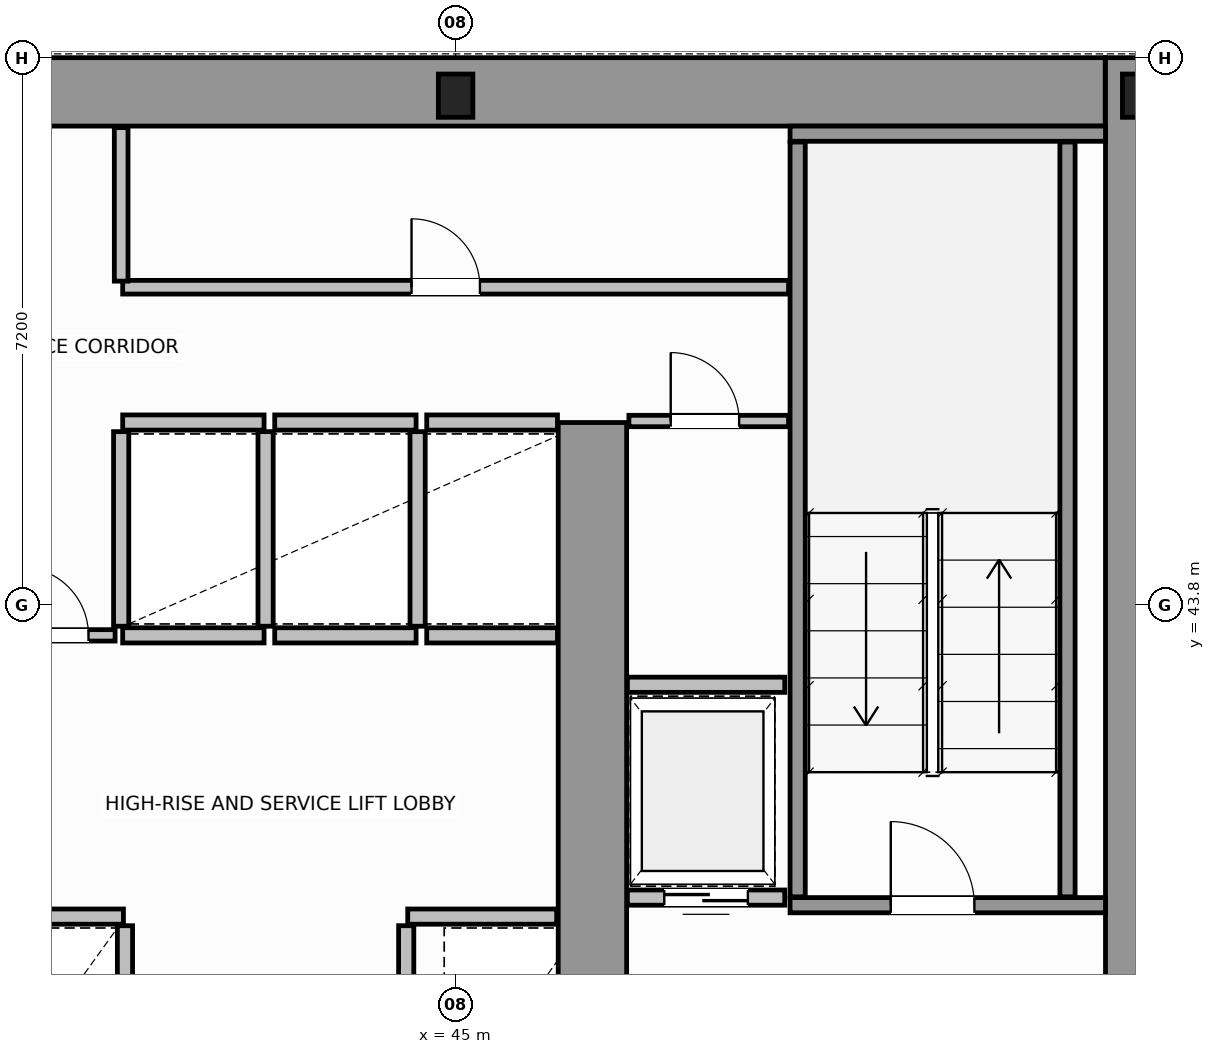
"""IFC4 building model, lengths in metres.
Left out: names, types, materials, properties, quantities, classifications, styles, units other than length and angle.
Written with IfcOpenShell. Run it as: python <this file> out.ifc"""

import sys

from ifc_helpers import new_model, si_unit, direction, frame, frame_2d, origin, origin_2d, place, context, subcontext, project, spatial, rectangle, i_section, extrude, source, transform, mapped, element, fill, save


model = new_model("IFC4")
c1 = context("Model", 3, precision=1e-05, world=origin(), true_north=direction((0.0, 1.0)))
c2 = subcontext(c1, "Body", "Model", "MODEL_VIEW")
j1 = project(units=[si_unit("LENGTHUNIT", "METRE"), si_unit("PLANEANGLEUNIT", "RADIAN")], contexts=[c1])
p1 = place(None, origin())
s1 = spatial("IfcSite", under=j1, at=p1, CompositionType="ELEMENT")
p2 = place(p1, origin())
s2 = spatial("IfcBuilding", under=s1, at=p2, CompositionType="ELEMENT")
p3 = place(p2, frame((0.0, 0.0, 56.8)))
s3 = spatial("IfcBuildingStorey", under=s2, at=p3, CompositionType="ELEMENT", Elevation=56.8)
m1 = source(origin(), c2, "Body", "SweptSolid", [
    extrude(i_section(OverallWidth=0.454, OverallDepth=0.569, WebThickness=0.078, FlangeThickness=0.08, FilletRadius=0.015, at=origin_2d()), origin(), (0.0, 0.0, 1.0), 3.8),
])
for number, where, z_axis, x_axis in (
    (1, (45.0, 50.5, 0.0), (0.0, 0.0, 1.0), (1.0, 0.0, 0.0)),
    (2, (54.0, 50.5, 0.0), (0.0, 0.0, 1.0), (1.0, 0.0, 0.0)),
):
    element("IfcColumn", number, at=place(p3, frame(where, z_axis=z_axis, x_axis=x_axis)), inside=s3, PredefinedType="COLUMN", context=c2, shape_type="MappedRepresentation", body=[
        mapped(m1, transform((0.0, 0.0, 0.0), scale=1.0)),
    ])
p4 = place(p3, frame((34.002, 50.55, 0.0), z_axis=(0.0, 0.0, 1.0), x_axis=(1.0, 0.0, 0.0)))
e3 = element("IfcWall", 3, at=p4, inside=s3, PredefinedType="SHEAR", context=c2, shape_type="SweptSolid", body=[
    extrude(rectangle(XDim=19.544, YDim=0.9, at=frame_2d((9.772, 0.0))), origin(), (0.0, 0.0, 1.0), 3.8),
])
p5 = place(p3, frame((54.0, 36.5, 0.0), z_axis=(0.0, 0.0, 1.0), x_axis=(0.0, 1.0, 0.0)))
e4 = element("IfcWall", 4, at=p5, inside=s3, PredefinedType="SHEAR", context=c2, shape_type="SweptSolid", body=[
    extrude(rectangle(XDim=14.5, YDim=0.9, at=frame_2d((7.25, 0.0))), origin(), (0.0, 0.0, 1.0), 3.8),
])
p6 = place(p3, frame((46.8, 36.97, 0.0), z_axis=(0.0, 0.0, 1.0), x_axis=(0.0, 1.0, 0.0)))
e5 = element("IfcWall", 5, at=p6, inside=s3, PredefinedType="SHEAR", context=c2, shape_type="SweptSolid", body=[
    extrude(rectangle(XDim=9.23, YDim=0.9, at=frame_2d((4.615, 0.0))), origin(), (0.0, 0.0, 1.0), 3.8),
])
p7 = place(p3, frame((49.4, 39.85, 0.0), z_axis=(0.0, 0.0, 1.0), x_axis=(1.0, 0.0, 0.0)))
e6 = element("IfcWall", 6, at=p7, inside=s3, PredefinedType="SOLIDWALL", context=c2, shape_type="SweptSolid", body=[
    extrude(rectangle(XDim=4.15, YDim=0.2, at=frame_2d((2.075, 0.0))), origin(), (0.0, 0.0, 1.0), 3.8),
])
p8 = place(p7, frame((1.325, 0.0, 0.0)))
e7 = element("IfcOpeningElement", 7, at=p8, cuts=e6, PredefinedType="OPENING", context=c2, shape_type="SweptSolid", body=[
    extrude(rectangle(XDim=1.1, YDim=2.15, at=frame_2d((0.55, 1.075))), frame((0.0, 0.11, 0.0), z_axis=(0.0, -1.0, 0.0), x_axis=(1.0, 0.0, 0.0)), (0.0, 0.0, 1.0), 0.22),
])
p9 = place(p3, frame((49.4, 50.0, 0.0), z_axis=(0.0, 0.0, 1.0), x_axis=(1.0, 0.0, 0.0)))
e8 = element("IfcWall", 8, at=p9, inside=s3, PredefinedType="SOLIDWALL", context=c2, shape_type="SweptSolid", body=[
    extrude(rectangle(XDim=4.15, YDim=0.2, at=frame_2d((2.075, 0.0))), origin(), (0.0, 0.0, 1.0), 3.8),
])
for number, where, z_axis, x_axis in (
    (9, (49.5, 39.96, 0.0), (0.0, 0.0, 1.0), (0.0, 1.0, 0.0)),
    (10, (53.05, 39.96, 0.0), (0.0, 0.0, 1.0), (0.0, 1.0, 0.0)),
):
    element("IfcWall", number, at=place(p3, frame(where, z_axis=z_axis, x_axis=x_axis)), inside=s3, PredefinedType="SOLIDWALL", context=c2, shape_type="SweptSolid", body=[
        extrude(rectangle(XDim=9.93, YDim=0.2, at=frame_2d((4.965, 0.0))), origin(), (0.0, 0.0, 1.0), 3.8),
    ])
p10 = place(p3, frame((38.86, 39.7, 0.0), z_axis=(0.0, 0.0, 1.0), x_axis=(1.0, 0.0, 0.0)))
e11 = element("IfcWall", 11, at=p10, inside=s3, PredefinedType="SOLIDWALL", context=c2, shape_type="SweptSolid", body=[
    extrude(rectangle(XDim=1.77, YDim=0.2, at=frame_2d((0.885, 0.0))), origin(), (0.0, 0.0, 1.0), 3.58),
])
p11 = place(p3, frame((40.65, 37.02, 0.0), z_axis=(0.0, 0.0, 1.0), x_axis=(0.0, 1.0, 0.0)))
e12 = element("IfcWall", 12, at=p11, inside=s3, PredefinedType="SOLIDWALL", context=c2, shape_type="SweptSolid", body=[
    extrude(rectangle(XDim=2.56, YDim=0.2, at=frame_2d((1.28, 0.0))), origin(), (0.0, 0.0, 1.0), 3.58),
])
p12 = place(p3, frame((44.37, 39.7, 0.0), z_axis=(0.0, 0.0, 1.0), x_axis=(1.0, 0.0, 0.0)))
e13 = element("IfcWall", 13, at=p12, inside=s3, PredefinedType="SOLIDWALL", context=c2, shape_type="SweptSolid", body=[
    extrude(rectangle(XDim=1.96, YDim=0.2, at=frame_2d((0.98, 0.0))), origin(), (0.0, 0.0, 1.0), 3.58),
])
p13 = place(p3, frame((44.35, 37.02, 0.0), z_axis=(0.0, 0.0, 1.0), x_axis=(0.0, 1.0, 0.0)))
e14 = element("IfcWall", 14, at=p13, inside=s3, PredefinedType="SOLIDWALL", context=c2, shape_type="SweptSolid", body=[
    extrude(rectangle(XDim=2.56, YDim=0.2, at=frame_2d((1.28, 0.0))), origin(), (0.0, 0.0, 1.0), 3.58),
])
for number, where, z_axis, x_axis in (
    (15, (40.62, 43.4, 0.0), (0.0, 0.0, 1.0), (1.0, 0.0, 0.0)),
    (16, (40.62, 46.2, 0.0), (0.0, 0.0, 1.0), (1.0, 0.0, 0.0)),
):
    element("IfcWall", number, at=place(p3, frame(where, z_axis=z_axis, x_axis=x_axis)), inside=s3, PredefinedType="SOLIDWALL", context=c2, shape_type="SweptSolid", body=[
        extrude(rectangle(XDim=1.86, YDim=0.2, at=frame_2d((0.93, 0.0))), origin(), (0.0, 0.0, 1.0), 3.58),
    ])
for number, where, z_axis, x_axis in (
    (17, (40.6, 43.52, 0.0), (0.0, 0.0, 1.0), (0.0, 1.0, 0.0)),
    (18, (42.5, 43.52, 0.0), (0.0, 0.0, 1.0), (0.0, 1.0, 0.0)),
):
    element("IfcWall", number, at=place(p3, frame(where, z_axis=z_axis, x_axis=x_axis)), inside=s3, PredefinedType="SOLIDWALL", context=c2, shape_type="SweptSolid", body=[
        extrude(rectangle(XDim=2.56, YDim=0.2, at=frame_2d((1.28, 0.0))), origin(), (0.0, 0.0, 1.0), 3.58),
    ])
for number, where, z_axis, x_axis in (
    (19, (42.62, 43.4, 0.0), (0.0, 0.0, 1.0), (1.0, 0.0, 0.0)),
    (20, (42.62, 46.2, 0.0), (0.0, 0.0, 1.0), (1.0, 0.0, 0.0)),
):
    element("IfcWall", number, at=place(p3, frame(where, z_axis=z_axis, x_axis=x_axis)), inside=s3, PredefinedType="SOLIDWALL", context=c2, shape_type="SweptSolid", body=[
        extrude(rectangle(XDim=1.86, YDim=0.2, at=frame_2d((0.93, 0.0))), origin(), (0.0, 0.0, 1.0), 3.58),
    ])
p14 = place(p3, frame((44.5, 43.52, 0.0), z_axis=(0.0, 0.0, 1.0), x_axis=(0.0, 1.0, 0.0)))
e21 = element("IfcWall", 21, at=p14, inside=s3, PredefinedType="SOLIDWALL", context=c2, shape_type="SweptSolid", body=[
    extrude(rectangle(XDim=2.56, YDim=0.2, at=frame_2d((1.28, 0.0))), origin(), (0.0, 0.0, 1.0), 3.58),
])
for number, where, z_axis, x_axis in (
    (22, (44.62, 43.4, 0.0), (0.0, 0.0, 1.0), (1.0, 0.0, 0.0)),
    (23, (44.62, 46.2, 0.0), (0.0, 0.0, 1.0), (1.0, 0.0, 0.0)),
):
    element("IfcWall", number, at=place(p3, frame(where, z_axis=z_axis, x_axis=x_axis)), inside=s3, PredefinedType="SOLIDWALL", context=c2, shape_type="SweptSolid", body=[
        extrude(rectangle(XDim=1.72, YDim=0.2, at=frame_2d((0.86, 0.0))), origin(), (0.0, 0.0, 1.0), 3.58),
    ])
p15 = place(p3, frame((47.26, 39.95, 0.0), z_axis=(0.0, 0.0, 1.0), x_axis=(1.0, 0.0, 0.0)))
e24 = element("IfcWall", 24, at=p15, inside=s3, PredefinedType="SOLIDWALL", context=c2, shape_type="SweptSolid", body=[
    extrude(rectangle(XDim=2.07, YDim=0.2, at=frame_2d((1.035, 0.0))), origin(), (0.0, 0.0, 1.0), 3.58),
])
p16 = place(p15, frame((0.485, 0.0, 0.0)))
e25 = element("IfcOpeningElement", 25, at=p16, cuts=e24, PredefinedType="OPENING", context=c2, shape_type="SweptSolid", body=[
    extrude(rectangle(XDim=1.1, YDim=2.15, at=frame_2d((0.55, 1.075))), frame((0.0, 0.11, 0.0), z_axis=(0.0, -1.0, 0.0), x_axis=(1.0, 0.0, 0.0)), (0.0, 0.0, 1.0), 0.22),
])
p17 = place(p3, frame((47.26, 42.75, 0.0), z_axis=(0.0, 0.0, 1.0), x_axis=(1.0, 0.0, 0.0)))
e26 = element("IfcWall", 26, at=p17, inside=s3, PredefinedType="SOLIDWALL", context=c2, shape_type="SweptSolid", body=[
    extrude(rectangle(XDim=2.07, YDim=0.2, at=frame_2d((1.035, 0.0))), origin(), (0.0, 0.0, 1.0), 3.58),
])
p18 = place(p3, frame((47.28, 46.22, 0.0), z_axis=(0.0, 0.0, 1.0), x_axis=(1.0, 0.0, 0.0)))
e27 = element("IfcWall", 27, at=p18, inside=s3, PredefinedType="PARTITIONING", context=c2, shape_type="SweptSolid", body=[
    extrude(rectangle(XDim=2.1, YDim=0.15, at=frame_2d((1.05, 0.0))), origin(), (0.0, 0.0, 1.0), 3.58),
])
p19 = place(p18, frame((0.55, 0.0, 0.0)))
e28 = element("IfcOpeningElement", 28, at=p19, cuts=e27, PredefinedType="OPENING", context=c2, shape_type="SweptSolid", body=[
    extrude(rectangle(XDim=0.9, YDim=2.1, at=frame_2d((0.45, 1.05))), frame((0.0, 0.085, 0.0), z_axis=(0.0, -1.0, 0.0), x_axis=(1.0, 0.0, 0.0)), (0.0, 0.0, 1.0), 0.17),
])
p20 = place(p3, frame((38.92, 43.4, 0.0), z_axis=(0.0, 0.0, 1.0), x_axis=(1.0, 0.0, 0.0)))
e29 = element("IfcWall", 29, at=p20, inside=s3, PredefinedType="PARTITIONING", context=c2, shape_type="SweptSolid", body=[
    extrude(rectangle(XDim=1.6, YDim=0.15, at=frame_2d((0.8, 0.0))), origin(), (0.0, 0.0, 1.0), 3.58),
])
p21 = place(p20, frame((0.35, 0.0, 0.0)))
e30 = element("IfcOpeningElement", 30, at=p21, cuts=e29, PredefinedType="OPENING", context=c2, shape_type="SweptSolid", body=[
    extrude(rectangle(XDim=0.9, YDim=2.1, at=frame_2d((0.45, 1.05))), frame((0.0, 0.085, 0.0), z_axis=(0.0, -1.0, 0.0), x_axis=(1.0, 0.0, 0.0)), (0.0, 0.0, 1.0), 0.17),
])
p22 = place(p3, frame((40.62, 47.98, 0.0), z_axis=(0.0, 0.0, 1.0), x_axis=(1.0, 0.0, 0.0)))
e31 = element("IfcWall", 31, at=p22, inside=s3, PredefinedType="PLUMBINGWALL", context=c2, shape_type="SweptSolid", body=[
    extrude(rectangle(XDim=8.76, YDim=0.18, at=frame_2d((4.38, 0.0))), origin(), (0.0, 0.0, 1.0), 3.58),
])
p23 = place(p22, frame((3.8, 0.0, 0.0)))
e32 = element("IfcOpeningElement", 32, at=p23, cuts=e31, PredefinedType="OPENING", context=c2, shape_type="SweptSolid", body=[
    extrude(rectangle(XDim=0.9, YDim=2.15, at=frame_2d((0.45, 1.075))), frame((0.0, 0.1, 0.0), z_axis=(0.0, -1.0, 0.0), x_axis=(1.0, 0.0, 0.0)), (0.0, 0.0, 1.0), 0.2),
])
p24 = place(p3, frame((40.6, 48.06, 0.0), z_axis=(0.0, 0.0, 1.0), x_axis=(0.0, 1.0, 0.0)))
e33 = element("IfcWall", 33, at=p24, inside=s3, PredefinedType="PLUMBINGWALL", context=c2, shape_type="SweptSolid", body=[
    extrude(rectangle(XDim=2.02, YDim=0.18, at=frame_2d((1.01, 0.0))), origin(), (0.0, 0.0, 1.0), 3.58),
])
m2 = source(origin(), c2, "Body", "SweptSolid", [
    extrude(rectangle(XDim=1.1, YDim=2.15, at=frame_2d((0.55, 1.075))), frame((0.0, 0.025, 0.0), z_axis=(0.0, -1.0, 0.0), x_axis=(1.0, 0.0, 0.0)), (0.0, 0.0, 1.0), 0.05),
])
p25 = place(p8, origin())
e34 = element("IfcDoor", 34, at=p25, inside=s3, OperationType="SINGLE_SWING_RIGHT", PredefinedType="DOOR", context=c2, shape_type="MappedRepresentation", body=[
    mapped(m2, transform((0.0, 0.0, 0.0), scale=1.0)),
])
fill(e7, e34)
p26 = place(p16, origin())
e35 = element("IfcDoor", 35, at=p26, inside=s3, OperationType="DOUBLE_DOOR_SLIDING", PredefinedType="DOOR", context=c2, shape_type="MappedRepresentation", body=[
    mapped(m2, transform((0.0, 0.0, 0.0), scale=1.0)),
])
fill(e25, e35)
m3 = source(origin(), c2, "Body", "SweptSolid", [
    extrude(rectangle(XDim=0.9, YDim=2.1, at=frame_2d((0.45, 1.05))), frame((0.0, 0.025, 0.0), z_axis=(0.0, -1.0, 0.0), x_axis=(1.0, 0.0, 0.0)), (0.0, 0.0, 1.0), 0.05),
])
p27 = place(p19, origin())
e36 = element("IfcDoor", 36, at=p27, inside=s3, OperationType="SINGLE_SWING_RIGHT", PredefinedType="DOOR", context=c2, shape_type="MappedRepresentation", body=[
    mapped(m3, transform((0.0, 0.0, 0.0), scale=1.0)),
])
fill(e28, e36)
p28 = place(p21, origin())
e37 = element("IfcDoor", 37, at=p28, inside=s3, OperationType="SINGLE_SWING_LEFT", PredefinedType="DOOR", context=c2, shape_type="MappedRepresentation", body=[
    mapped(m3, transform((0.0, 0.0, 0.0), scale=1.0)),
])
fill(e30, e37)
m4 = source(origin(), c2, "Body", "SweptSolid", [
    extrude(rectangle(XDim=0.9, YDim=2.15, at=frame_2d((0.45, 1.075))), frame((0.0, 0.025, 0.0), z_axis=(0.0, -1.0, 0.0), x_axis=(1.0, 0.0, 0.0)), (0.0, 0.0, 1.0), 0.05),
])
p29 = place(p23, origin())
e38 = element("IfcDoor", 38, at=p29, inside=s3, OperationType="SINGLE_SWING_RIGHT", PredefinedType="DOOR", context=c2, shape_type="MappedRepresentation", body=[
    mapped(m4, transform((0.0, 0.0, 0.0), scale=1.0)),
])
fill(e32, e38)
save(model, sys.argv[1])
